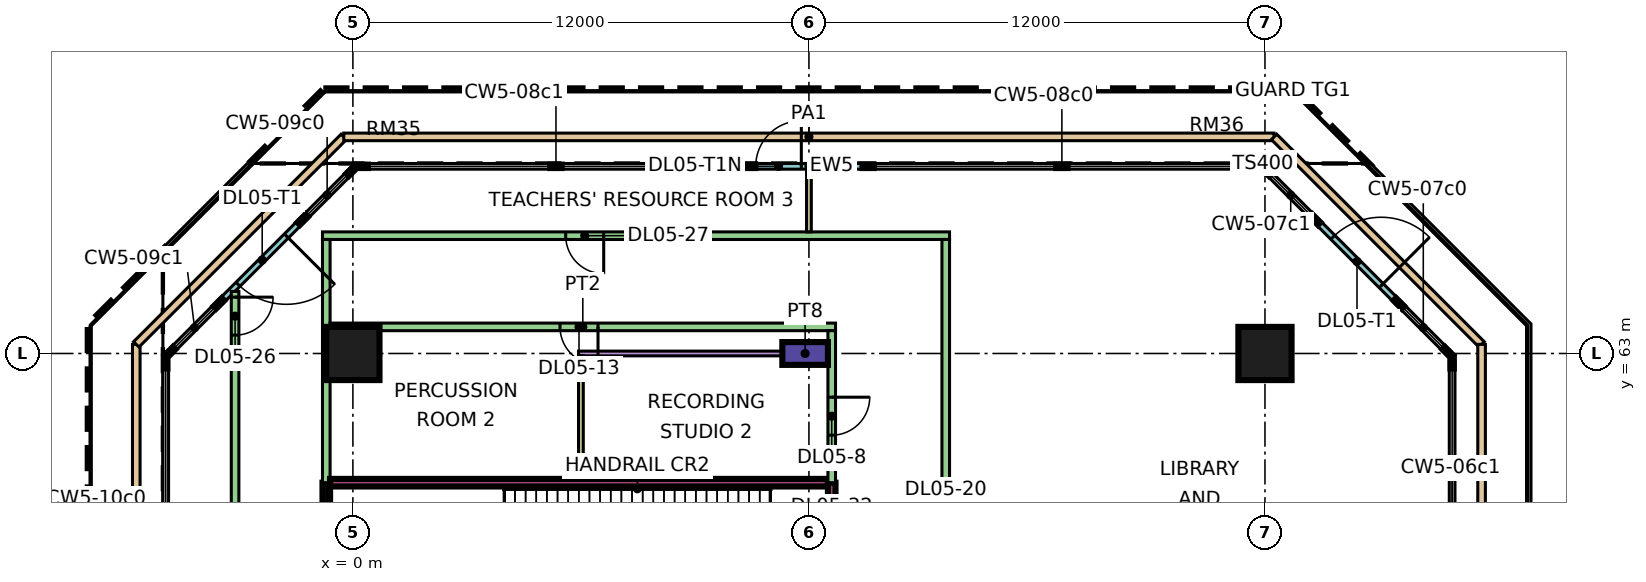
"""IFC4 building model, lengths in metres.
Left out: names, types, materials, properties, quantities, classifications, styles, units other than length and angle.
Written with IfcOpenShell. Run it as: python <this file> out.ifc"""

import sys

from ifc_helpers import new_model, si_unit, direction, frame, frame_2d, origin, origin_2d, place, context, subcontext, project, spatial, rectangle, extrude, element, fill, save


model = new_model("IFC4")
c1 = context("Model", 3, precision=1e-05, world=origin(), true_north=direction((0.0, 1.0)))
c2 = subcontext(c1, "Body", "Model", "MODEL_VIEW")
j1 = project(units=[si_unit("LENGTHUNIT", "METRE"), si_unit("PLANEANGLEUNIT", "RADIAN")], contexts=[c1])
p1 = place(None, origin())
s1 = spatial("IfcSite", under=j1, at=p1, CompositionType="ELEMENT")
p2 = place(p1, origin())
s2 = spatial("IfcBuilding", under=s1, at=p2, CompositionType="ELEMENT")
p3 = place(p2, frame((0.0, 0.0, 26.4)))
s3 = spatial("IfcBuildingStorey", under=s2, at=p3, CompositionType="ELEMENT", Elevation=26.4)
for number, where, z_axis, x_axis in (
    (1, (0.0, 63.0, 0.0), (0.0, 0.0, 1.0), (1.0, 0.0, 0.0)),
    (2, (24.0, 63.0, 0.0), (0.0, 0.0, 1.0), (1.0, 0.0, 0.0)),
):
    element("IfcColumn", number, at=place(p3, frame(where, z_axis=z_axis, x_axis=x_axis)), inside=s3, PredefinedType="COLUMN", context=c2, shape_type="SweptSolid", body=[
        extrude(rectangle(XDim=1.4, YDim=1.4, at=origin_2d()), origin(), (0.0, 0.0, 1.0), 9.0),
    ])
p4 = place(p3, frame((27.482, 64.361, 0.0), z_axis=(0.0, 0.0, 1.0), x_axis=(-0.707106781187, 0.707106781187, 0.0)))
e3 = element("IfcWall", 3, at=p4, inside=s3, PredefinedType="SOLIDWALL", context=c2, shape_type="SweptSolid", body=[
    extrude(rectangle(XDim=3.0, YDim=0.15, at=frame_2d((1.5, 0.0))), origin(), (0.0, 0.0, 1.0), 8.45),
])
p5 = place(p4, frame((0.6, 0.0, 0.0)))
e4 = element("IfcOpeningElement", 4, at=p5, cuts=e3, PredefinedType="OPENING", context=c2, shape_type="SweptSolid", body=[
    extrude(rectangle(XDim=1.8, YDim=2.4, at=frame_2d((0.9, 1.2))), frame((0.0, 0.085, 0.0), z_axis=(0.0, -1.0, 0.0), x_axis=(1.0, 0.0, 0.0)), (0.0, 0.0, 1.0), 0.17),
])
p6 = place(p3, frame((13.5, 67.925, 0.0), z_axis=(0.0, 0.0, 1.0), x_axis=(-1.0, 0.0, 0.0)))
e5 = element("IfcWall", 5, at=p6, inside=s3, PredefinedType="SOLIDWALL", context=c2, shape_type="SweptSolid", body=[
    extrude(rectangle(XDim=3.0, YDim=0.15, at=frame_2d((1.5, 0.0))), origin(), (0.0, 0.0, 1.0), 8.45),
])
p7 = place(p6, frame((1.7, 0.0, 0.0)))
e6 = element("IfcOpeningElement", 6, at=p7, cuts=e5, PredefinedType="OPENING", context=c2, shape_type="SweptSolid", body=[
    extrude(rectangle(XDim=1.2, YDim=2.4, at=frame_2d((0.6, 1.2))), frame((0.0, 0.085, 0.0), z_axis=(0.0, -1.0, 0.0), x_axis=(1.0, 0.0, 0.0)), (0.0, 0.0, 1.0), 0.17),
])
p8 = place(p3, frame((-1.361, 66.482, 0.0), z_axis=(0.0, 0.0, 1.0), x_axis=(-0.707106781187, -0.707106781187, 0.0)))
e7 = element("IfcWall", 7, at=p8, inside=s3, PredefinedType="SOLIDWALL", context=c2, shape_type="SweptSolid", body=[
    extrude(rectangle(XDim=3.0, YDim=0.15, at=frame_2d((1.5, 0.0))), origin(), (0.0, 0.0, 1.0), 8.45),
])
p9 = place(p8, frame((0.55, 0.0, 0.0)))
e8 = element("IfcOpeningElement", 8, at=p9, cuts=e7, PredefinedType="OPENING", context=c2, shape_type="SweptSolid", body=[
    extrude(rectangle(XDim=1.8, YDim=2.4, at=frame_2d((0.9, 1.2))), frame((0.0, 0.085, 0.0), z_axis=(0.0, -1.0, 0.0), x_axis=(1.0, 0.0, 0.0)), (0.0, 0.0, 1.0), 0.17),
])
p10 = place(p3, frame((-5.7, 10.76, 0.0), z_axis=(0.0, 0.0, 1.0), x_axis=(0.0, 1.0, 0.0)))
e9 = element("IfcWall", 9, at=p10, inside=s3, PredefinedType="PARAPET", context=c2, shape_type="SweptSolid", body=[
    extrude(rectangle(XDim=52.479, YDim=0.2, at=frame_2d((26.24, 0.0))), origin(), (0.0, 0.0, 1.0), 0.5),
])
p11 = place(p3, frame((-5.7, 63.24, 0.0), z_axis=(0.0, 0.0, 1.0), x_axis=(0.707106781187, 0.707106781187, 0.0)))
e10 = element("IfcWall", 10, at=p11, inside=s3, PredefinedType="PARAPET", context=c2, shape_type="SweptSolid", body=[
    extrude(rectangle(XDim=7.722, YDim=0.2, at=frame_2d((3.861, 0.0))), origin(), (0.0, 0.0, 1.0), 0.5),
])
p12 = place(p3, frame((-0.24, 68.7, 0.0), z_axis=(0.0, 0.0, 1.0), x_axis=(1.0, 0.0, 0.0)))
e11 = element("IfcWall", 11, at=p12, inside=s3, PredefinedType="PARAPET", context=c2, shape_type="SweptSolid", body=[
    extrude(rectangle(XDim=24.479, YDim=0.2, at=frame_2d((12.24, 0.0))), origin(), (0.0, 0.0, 1.0), 0.5),
])
p13 = place(p3, frame((24.24, 68.7, 0.0), z_axis=(0.0, 0.0, 1.0), x_axis=(0.707106781187, -0.707106781187, 0.0)))
e12 = element("IfcWall", 12, at=p13, inside=s3, PredefinedType="PARAPET", context=c2, shape_type="SweptSolid", body=[
    extrude(rectangle(XDim=7.722, YDim=0.2, at=frame_2d((3.861, 0.0))), origin(), (0.0, 0.0, 1.0), 0.5),
])
p14 = place(p3, frame((29.7, 63.24, 0.0), z_axis=(0.0, 0.0, 1.0), x_axis=(0.0, -1.0, 0.0)))
e13 = element("IfcWall", 13, at=p14, inside=s3, PredefinedType="PARAPET", context=c2, shape_type="SweptSolid", body=[
    extrude(rectangle(XDim=21.0, YDim=0.2, at=frame_2d((10.5, 0.0))), origin(), (0.0, 0.0, 1.0), 0.5),
])
p15 = place(p3, frame((-3.1, 8.302, 0.0), z_axis=(0.0, 0.0, 1.0), x_axis=(0.0, 1.0, 0.0)))
e14 = element("IfcWall", 14, at=p15, inside=s3, PredefinedType="PARTITIONING", context=c2, shape_type="SweptSolid", body=[
    extrude(rectangle(XDim=56.331, YDim=0.2, at=frame_2d((28.166, 0.0))), origin(), (0.0, 0.0, 1.0), 8.45),
])
p16 = place(p15, frame((29.431, 0.0, 0.0)))
e15 = element("IfcOpeningElement", 15, at=p16, cuts=e14, PredefinedType="OPENING", context=c2, shape_type="SweptSolid", body=[
    extrude(rectangle(XDim=1.0, YDim=2.1, at=frame_2d((0.5, 1.05))), frame((0.0, 0.11, 0.0), z_axis=(0.0, -1.0, 0.0), x_axis=(1.0, 0.0, 0.0)), (0.0, 0.0, 1.0), 0.22),
])
p17 = place(p15, frame((55.181, 0.0, 0.0)))
e16 = element("IfcOpeningElement", 16, at=p17, cuts=e14, PredefinedType="OPENING", context=c2, shape_type="SweptSolid", body=[
    extrude(rectangle(XDim=1.0, YDim=2.1, at=frame_2d((0.5, 1.05))), frame((0.0, 0.11, 0.0), z_axis=(0.0, -1.0, 0.0), x_axis=(1.0, 0.0, 0.0)), (0.0, 0.0, 1.0), 0.22),
])
p18 = place(p3, frame((-0.8, 66.1, 0.0), z_axis=(0.0, 0.0, 1.0), x_axis=(1.0, 0.0, 0.0)))
e17 = element("IfcWall", 17, at=p18, inside=s3, PredefinedType="PARTITIONING", context=c2, shape_type="SweptSolid", body=[
    extrude(rectangle(XDim=16.5, YDim=0.2, at=frame_2d((8.25, 0.0))), origin(), (0.0, 0.0, 1.0), 8.45),
])
p19 = place(p18, frame((6.4, 0.0, 0.0)))
e18 = element("IfcOpeningElement", 18, at=p19, cuts=e17, PredefinedType="OPENING", context=c2, shape_type="SweptSolid", body=[
    extrude(rectangle(XDim=1.0, YDim=2.1, at=frame_2d((0.5, 1.05))), frame((0.0, 0.11, 0.0), z_axis=(0.0, -1.0, 0.0), x_axis=(1.0, 0.0, 0.0)), (0.0, 0.0, 1.0), 0.22),
])
p20 = place(p3, frame((-0.7, 56.0, 0.0), z_axis=(0.0, 0.0, 1.0), x_axis=(0.0, 1.0, 0.0)))
e19 = element("IfcWall", 19, at=p20, inside=s3, PredefinedType="SOLIDWALL", context=c2, shape_type="SweptSolid", body=[
    extrude(rectangle(XDim=3.6, YDim=0.2, at=frame_2d((1.8, 0.0))), origin(), (0.0, 0.0, 1.0), 8.45),
])
p21 = place(p3, frame((-0.7, 59.6, 0.0), z_axis=(0.0, 0.0, 1.0), x_axis=(0.0, 1.0, 0.0)))
e20 = element("IfcWall", 20, at=p21, inside=s3, PredefinedType="PARTITIONING", context=c2, shape_type="SweptSolid", body=[
    extrude(rectangle(XDim=6.4, YDim=0.2, at=frame_2d((3.2, 0.0))), origin(), (0.0, 0.0, 1.0), 8.45),
])
p22 = place(p3, frame((-0.6, 59.6, 0.0), z_axis=(0.0, 0.0, 1.0), x_axis=(1.0, 0.0, 0.0)))
e21 = element("IfcWall", 21, at=p22, inside=s3, PredefinedType="SOLIDWALL", context=c2, shape_type="SweptSolid", body=[
    extrude(rectangle(XDim=13.1, YDim=0.2, at=frame_2d((6.55, 0.0))), origin(), (0.0, 0.0, 1.0), 8.45),
])
p23 = place(p3, frame((-0.6, 63.7, 0.0), z_axis=(0.0, 0.0, 1.0), x_axis=(1.0, 0.0, 0.0)))
e22 = element("IfcWall", 22, at=p23, inside=s3, PredefinedType="PARTITIONING", context=c2, shape_type="SweptSolid", body=[
    extrude(rectangle(XDim=13.3, YDim=0.2, at=frame_2d((6.65, 0.0))), origin(), (0.0, 0.0, 1.0), 8.45),
])
p24 = place(p23, frame((6.05, 0.0, 0.0)))
e23 = element("IfcOpeningElement", 23, at=p24, cuts=e22, PredefinedType="OPENING", context=c2, shape_type="SweptSolid", body=[
    extrude(rectangle(XDim=1.0, YDim=2.1, at=frame_2d((0.5, 1.05))), frame((0.0, 0.11, 0.0), z_axis=(0.0, -1.0, 0.0), x_axis=(1.0, 0.0, 0.0)), (0.0, 0.0, 1.0), 0.22),
])
p25 = place(p3, frame((5.938, 63.0, 0.0), z_axis=(0.0, 0.0, 1.0), x_axis=(1.0, 0.0, 0.0)))
e24 = element("IfcWall", 24, at=p25, inside=s3, PredefinedType="PARTITIONING", context=c2, shape_type="SweptSolid", body=[
    extrude(rectangle(XDim=5.362, YDim=0.125, at=frame_2d((2.681, 0.0))), origin(), (0.0, 0.0, 1.0), 6.95),
])
p26 = place(p3, frame((6.0, 59.7, 0.0), z_axis=(0.0, 0.0, 1.0), x_axis=(0.0, 1.0, 0.0)))
e25 = element("IfcWall", 25, at=p26, inside=s3, PredefinedType="PARTITIONING", context=c2, shape_type="SweptSolid", body=[
    extrude(rectangle(XDim=3.238, YDim=0.125, at=frame_2d((1.619, 0.0))), origin(), (0.0, 0.0, 1.0), 8.45),
])
p27 = place(p3, frame((12.0, 66.2, 0.0), z_axis=(0.0, 0.0, 1.0), x_axis=(0.0, 1.0, 0.0)))
e26 = element("IfcWall", 26, at=p27, inside=s3, PredefinedType="PARTITIONING", context=c2, shape_type="SweptSolid", body=[
    extrude(rectangle(XDim=1.651, YDim=0.125, at=frame_2d((0.826, 0.0))), origin(), (0.0, 0.0, 1.0), 8.45),
])
p28 = place(p3, frame((12.6, 56.0, 0.0), z_axis=(0.0, 0.0, 1.0), x_axis=(0.0, 1.0, 0.0)))
e27 = element("IfcWall", 27, at=p28, inside=s3, PredefinedType="SOLIDWALL", context=c2, shape_type="SweptSolid", body=[
    extrude(rectangle(XDim=3.6, YDim=0.2, at=frame_2d((1.8, 0.0))), origin(), (0.0, 0.0, 1.0), 8.45),
])
p29 = place(p28, frame((1.25, 0.0, 0.0)))
e28 = element("IfcOpeningElement", 28, at=p29, cuts=e27, PredefinedType="OPENING", context=c2, shape_type="SweptSolid", body=[
    extrude(rectangle(XDim=1.2, YDim=2.1, at=frame_2d((0.6, 1.05))), frame((0.0, 0.11, 0.0), z_axis=(0.0, -1.0, 0.0), x_axis=(1.0, 0.0, 0.0)), (0.0, 0.0, 1.0), 0.22),
])
p30 = place(p3, frame((12.6, 59.6, 0.0), z_axis=(0.0, 0.0, 1.0), x_axis=(0.0, 1.0, 0.0)))
e29 = element("IfcWall", 29, at=p30, inside=s3, PredefinedType="PARTITIONING", context=c2, shape_type="SweptSolid", body=[
    extrude(rectangle(XDim=4.0, YDim=0.2, at=frame_2d((2.0, 0.0))), origin(), (0.0, 0.0, 1.0), 8.45),
])
p31 = place(p30, frame((1.25, 0.0, 0.0)))
e30 = element("IfcOpeningElement", 30, at=p31, cuts=e29, PredefinedType="OPENING", context=c2, shape_type="SweptSolid", body=[
    extrude(rectangle(XDim=1.0, YDim=2.1, at=frame_2d((0.5, 1.05))), frame((0.0, 0.11, 0.0), z_axis=(0.0, -1.0, 0.0), x_axis=(1.0, 0.0, 0.0)), (0.0, 0.0, 1.0), 0.22),
])
p32 = place(p3, frame((15.6, 51.225, 0.0), z_axis=(0.0, 0.0, 1.0), x_axis=(0.0, 1.0, 0.0)))
e31 = element("IfcWall", 31, at=p32, inside=s3, PredefinedType="PARTITIONING", context=c2, shape_type="SweptSolid", body=[
    extrude(rectangle(XDim=14.775, YDim=0.2, at=frame_2d((7.387, 0.0))), origin(), (0.0, 0.0, 1.0), 8.45),
])
p33 = place(p32, frame((5.675, 0.0, 0.0)))
e32 = element("IfcOpeningElement", 32, at=p33, cuts=e31, PredefinedType="OPENING", context=c2, shape_type="SweptSolid", body=[
    extrude(rectangle(XDim=1.8, YDim=2.1, at=frame_2d((0.9, 1.05))), frame((0.0, 0.11, 0.0), z_axis=(0.0, -1.0, 0.0), x_axis=(1.0, 0.0, 0.0)), (0.0, 0.0, 1.0), 0.22),
])
p34 = place(p3, frame((11.3, 63.0, 0.0), z_axis=(0.0, 0.0, 1.0), x_axis=(1.0, 0.0, 0.0)))
e33 = element("IfcWall", 33, at=p34, inside=s3, PredefinedType="SOLIDWALL", context=c2, shape_type="SweptSolid", body=[
    extrude(rectangle(XDim=1.2, YDim=0.6, at=frame_2d((0.6, 0.0))), origin(), (0.0, 0.0, 1.0), 6.95),
])
p35 = place(p5, frame((1.8, 0.0, 0.0), z_axis=(0.0, 0.0, 1.0), x_axis=(-1.0, 0.0, 0.0)))
e34 = element("IfcDoor", 34, at=p35, inside=s3, OperationType="DOUBLE_DOOR_SINGLE_SWING", PredefinedType="DOOR", context=c2, shape_type="SweptSolid", body=[
    extrude(rectangle(XDim=1.8, YDim=2.4, at=frame_2d((0.9, 1.2))), frame((0.0, 0.025, 0.0), z_axis=(0.0, -1.0, 0.0), x_axis=(1.0, 0.0, 0.0)), (0.0, 0.0, 1.0), 0.05),
])
fill(e4, e34)
p36 = place(p7, frame((1.2, 0.0, 0.0), z_axis=(0.0, 0.0, 1.0), x_axis=(-1.0, 0.0, 0.0)))
e35 = element("IfcDoor", 35, at=p36, inside=s3, OperationType="DOUBLE_DOOR_SINGLE_SWING", PredefinedType="DOOR", context=c2, shape_type="SweptSolid", body=[
    extrude(rectangle(XDim=1.2, YDim=2.4, at=frame_2d((0.6, 1.2))), frame((0.0, 0.025, 0.0), z_axis=(0.0, -1.0, 0.0), x_axis=(1.0, 0.0, 0.0)), (0.0, 0.0, 1.0), 0.05),
])
fill(e6, e35)
p37 = place(p9, origin())
e36 = element("IfcDoor", 36, at=p37, inside=s3, OperationType="DOUBLE_DOOR_SINGLE_SWING", PredefinedType="DOOR", context=c2, shape_type="SweptSolid", body=[
    extrude(rectangle(XDim=1.8, YDim=2.4, at=frame_2d((0.9, 1.2))), frame((0.0, 0.025, 0.0), z_axis=(0.0, -1.0, 0.0), x_axis=(1.0, 0.0, 0.0)), (0.0, 0.0, 1.0), 0.05),
])
fill(e8, e36)
p38 = place(p31, origin())
e37 = element("IfcDoor", 37, at=p38, inside=s3, OperationType="SINGLE_SWING_RIGHT", PredefinedType="DOOR", context=c2, shape_type="SweptSolid", body=[
    extrude(rectangle(XDim=1.0, YDim=2.1, at=frame_2d((0.5, 1.05))), frame((0.0, 0.025, 0.0), z_axis=(0.0, -1.0, 0.0), x_axis=(1.0, 0.0, 0.0)), (0.0, 0.0, 1.0), 0.05),
])
fill(e30, e37)
p39 = place(p24, origin())
e38 = element("IfcDoor", 38, at=p39, inside=s3, OperationType="SINGLE_SWING_RIGHT", PredefinedType="DOOR", context=c2, shape_type="SweptSolid", body=[
    extrude(rectangle(XDim=1.0, YDim=2.1, at=frame_2d((0.5, 1.05))), frame((0.0, 0.025, 0.0), z_axis=(0.0, -1.0, 0.0), x_axis=(1.0, 0.0, 0.0)), (0.0, 0.0, 1.0), 0.05),
])
fill(e23, e38)
p40 = place(p17, origin())
e39 = element("IfcDoor", 39, at=p40, inside=s3, OperationType="SINGLE_SWING_RIGHT", PredefinedType="DOOR", context=c2, shape_type="SweptSolid", body=[
    extrude(rectangle(XDim=1.0, YDim=2.1, at=frame_2d((0.5, 1.05))), frame((0.0, 0.025, 0.0), z_axis=(0.0, -1.0, 0.0), x_axis=(1.0, 0.0, 0.0)), (0.0, 0.0, 1.0), 0.05),
])
fill(e16, e39)
p41 = place(p19, origin())
e40 = element("IfcDoor", 40, at=p41, inside=s3, OperationType="SINGLE_SWING_RIGHT", PredefinedType="DOOR", context=c2, shape_type="SweptSolid", body=[
    extrude(rectangle(XDim=1.0, YDim=2.1, at=frame_2d((0.5, 1.05))), frame((0.0, 0.025, 0.0), z_axis=(0.0, -1.0, 0.0), x_axis=(1.0, 0.0, 0.0)), (0.0, 0.0, 1.0), 0.05),
])
fill(e18, e40)
save(model, sys.argv[1])
